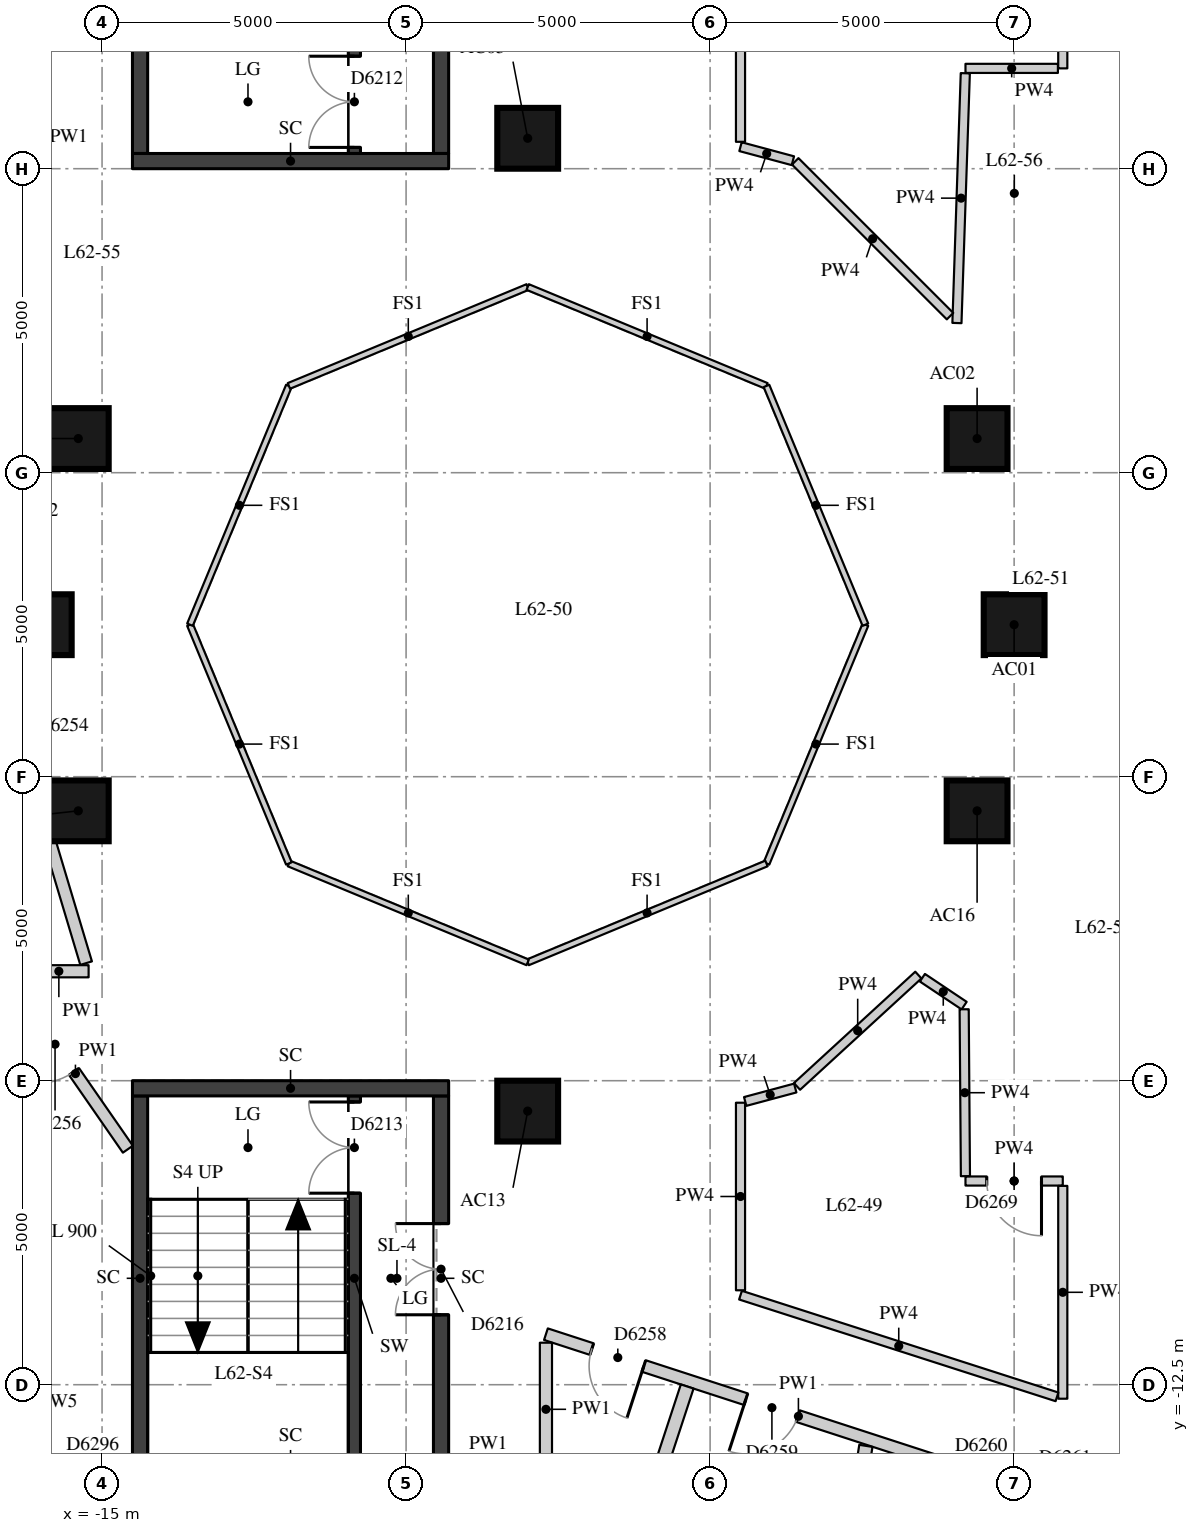
"""IFC4 building model, lengths in metres.
Left out: names, types, materials, properties, quantities, classifications, styles, units other than length and angle.
Written with IfcOpenShell. Run it as: python <this file> out.ifc"""

import sys

from ifc_helpers import new_model, si_unit, direction, frame, frame_2d, origin, origin_2d, place, context, subcontext, project, spatial, rectangle, extrude, element, fill, save


model = new_model("IFC4")
c1 = context("Model", 3, precision=1e-05, world=origin(), true_north=direction((0.0, 1.0)))
c2 = subcontext(c1, "Body", "Model", "MODEL_VIEW")
j1 = project(units=[si_unit("LENGTHUNIT", "METRE"), si_unit("PLANEANGLEUNIT", "RADIAN")], contexts=[c1])
p1 = place(None, origin())
s1 = spatial("IfcSite", under=j1, at=p1, CompositionType="ELEMENT")
p2 = place(p1, origin())
s2 = spatial("IfcBuilding", under=s1, at=p2, CompositionType="ELEMENT")
p3 = place(p2, frame((0.0, 0.0, 218.9)))
s3 = spatial("IfcBuildingStorey", under=s2, at=p3, CompositionType="ELEMENT", Elevation=218.9)
for number, where, z_axis, x_axis in (
    (1, (0.0, 0.0, 0.0), (0.0, 0.0, 1.0), (1.0, 0.0, 0.0)),
    (2, (-0.609, 3.062, 0.0), (0.0, 0.0, 1.0), (1.0, 0.0, 0.0)),
    (3, (-8.0, 8.0, 0.0), (0.0, 0.0, 1.0), (1.0, 0.0, 0.0)),
    (4, (-15.391, 3.062, 0.0), (0.0, 0.0, 1.0), (1.0, 0.0, 0.0)),
    (5, (-16.0, 0.0, 0.0), (0.0, 0.0, 1.0), (1.0, 0.0, 0.0)),
    (6, (-15.391, -3.062, 0.0), (0.0, 0.0, 1.0), (1.0, 0.0, 0.0)),
    (7, (-8.0, -8.0, 0.0), (0.0, 0.0, 1.0), (1.0, 0.0, 0.0)),
    (8, (-0.609, -3.062, 0.0), (0.0, 0.0, 1.0), (1.0, 0.0, 0.0)),
):
    element("IfcColumn", number, at=place(p3, frame(where, z_axis=z_axis, x_axis=x_axis)), inside=s3, PredefinedType="COLUMN", context=c2, shape_type="SweptSolid", body=[
        extrude(rectangle(XDim=1.0, YDim=1.0, at=origin_2d()), origin(), (0.0, 0.0, 1.0), 3.3),
    ])
p4 = place(p3, frame((-17.769, -12.725, 0.0), z_axis=(0.0, 0.0, 1.0), x_axis=(0.742485377568, -0.669862272484, 0.0)))
e9 = element("IfcWall", 9, at=p4, inside=s3, PredefinedType="SOLIDWALL", context=c2, shape_type="SweptSolid", body=[
    extrude(rectangle(XDim=3.98, YDim=0.45, at=frame_2d((1.99, 0.0))), origin(), (0.0, 0.0, 1.0), 3.02),
])
p5 = place(p4, frame((0.915, 0.0, 0.4)))
e10 = element("IfcOpeningElement", 10, at=p5, cuts=e9, PredefinedType="OPENING", context=c2, shape_type="SweptSolid", body=[
    extrude(rectangle(XDim=1.0, YDim=1.75, at=frame_2d((0.5, 0.875))), frame((0.0, 0.235, 0.0), z_axis=(0.0, -1.0, 0.0), x_axis=(1.0, 0.0, 0.0)), (0.0, 0.0, 1.0), 0.47),
])
p6 = place(p4, frame((2.065, 0.0, 0.0)))
e11 = element("IfcOpeningElement", 11, at=p6, cuts=e9, PredefinedType="OPENING", context=c2, shape_type="SweptSolid", body=[
    extrude(rectangle(XDim=1.0, YDim=2.15, at=frame_2d((0.5, 1.075))), frame((0.0, 0.235, 0.0), z_axis=(0.0, -1.0, 0.0), x_axis=(1.0, 0.0, 0.0)), (0.0, 0.0, 1.0), 0.47),
])
p7 = place(p3, frame((-10.85, 7.75, 0.0), z_axis=(0.0, 0.0, 1.0), x_axis=(0.0, 1.0, 0.0)))
e12 = element("IfcWall", 12, at=p7, inside=s3, PredefinedType="SHEAR", context=c2, shape_type="SweptSolid", body=[
    extrude(rectangle(XDim=6.0, YDim=0.2, at=frame_2d((3.0, 0.0))), origin(), (0.0, 0.0, 1.0), 3.02),
])
p8 = place(p7, frame((0.1, 0.0, 0.0)))
e13 = element("IfcOpeningElement", 13, at=p8, cuts=e12, PredefinedType="OPENING", context=c2, shape_type="SweptSolid", body=[
    extrude(rectangle(XDim=1.5, YDim=2.1, at=frame_2d((0.75, 1.05))), frame((0.0, 0.11, 0.0), z_axis=(0.0, -1.0, 0.0), x_axis=(1.0, 0.0, 0.0)), (0.0, 0.0, 1.0), 0.22),
])
p9 = place(p3, frame((-10.85, -13.75, 0.0), z_axis=(0.0, 0.0, 1.0), x_axis=(0.0, 1.0, 0.0)))
e14 = element("IfcWall", 14, at=p9, inside=s3, PredefinedType="SHEAR", context=c2, shape_type="SweptSolid", body=[
    extrude(rectangle(XDim=6.0, YDim=0.2, at=frame_2d((3.0, 0.0))), origin(), (0.0, 0.0, 1.0), 3.02),
])
p10 = place(p9, frame((4.4, 0.0, 0.0)))
e15 = element("IfcOpeningElement", 15, at=p10, cuts=e14, PredefinedType="OPENING", context=c2, shape_type="SweptSolid", body=[
    extrude(rectangle(XDim=1.5, YDim=2.1, at=frame_2d((0.75, 1.05))), frame((0.0, 0.11, 0.0), z_axis=(0.0, -1.0, 0.0), x_axis=(1.0, 0.0, 0.0)), (0.0, 0.0, 1.0), 0.22),
])
p11 = place(p3, frame((-14.375, 7.75, -0.28), z_axis=(0.0, 0.0, 1.0), x_axis=(0.0, 1.0, 0.0)))
e16 = element("IfcWall", 16, at=p11, inside=s3, PredefinedType="SHEAR", context=c2, shape_type="SweptSolid", body=[
    extrude(rectangle(XDim=6.0, YDim=0.25, at=frame_2d((3.0, 0.0))), origin(), (0.0, 0.0, 1.0), 3.3),
])
p12 = place(p3, frame((-9.425, 7.75, -0.28), z_axis=(0.0, 0.0, 1.0), x_axis=(0.0, 1.0, 0.0)))
e17 = element("IfcWall", 17, at=p12, inside=s3, PredefinedType="SHEAR", context=c2, shape_type="SweptSolid", body=[
    extrude(rectangle(XDim=6.0, YDim=0.25, at=frame_2d((3.0, 0.0))), origin(), (0.0, 0.0, 1.0), 3.3),
])
p13 = place(p12, frame((2.1, 0.0, 0.28)))
e18 = element("IfcOpeningElement", 18, at=p13, cuts=e17, PredefinedType="OPENING", context=c2, shape_type="SweptSolid", body=[
    extrude(rectangle(XDim=1.5, YDim=2.1, at=frame_2d((0.75, 1.05))), frame((0.0, 0.135, 0.0), z_axis=(0.0, -1.0, 0.0), x_axis=(1.0, 0.0, 0.0)), (0.0, 0.0, 1.0), 0.27),
])
p14 = place(p3, frame((-14.5, 7.625, -0.28), z_axis=(0.0, 0.0, 1.0), x_axis=(1.0, 0.0, 0.0)))
e19 = element("IfcWall", 19, at=p14, inside=s3, PredefinedType="SHEAR", context=c2, shape_type="SweptSolid", body=[
    extrude(rectangle(XDim=5.2, YDim=0.25, at=frame_2d((2.6, 0.0))), origin(), (0.0, 0.0, 1.0), 3.3),
])
p15 = place(p3, frame((-14.375, -13.75, -0.28), z_axis=(0.0, 0.0, 1.0), x_axis=(0.0, 1.0, 0.0)))
e20 = element("IfcWall", 20, at=p15, inside=s3, PredefinedType="SHEAR", context=c2, shape_type="SweptSolid", body=[
    extrude(rectangle(XDim=6.0, YDim=0.25, at=frame_2d((3.0, 0.0))), origin(), (0.0, 0.0, 1.0), 3.3),
])
p16 = place(p3, frame((-9.425, -13.75, -0.28), z_axis=(0.0, 0.0, 1.0), x_axis=(0.0, 1.0, 0.0)))
e21 = element("IfcWall", 21, at=p16, inside=s3, PredefinedType="SHEAR", context=c2, shape_type="SweptSolid", body=[
    extrude(rectangle(XDim=6.0, YDim=0.25, at=frame_2d((3.0, 0.0))), origin(), (0.0, 0.0, 1.0), 3.3),
])
p17 = place(p16, frame((2.4, 0.0, 0.28)))
e22 = element("IfcOpeningElement", 22, at=p17, cuts=e21, PredefinedType="OPENING", context=c2, shape_type="SweptSolid", body=[
    extrude(rectangle(XDim=1.5, YDim=2.1, at=frame_2d((0.75, 1.05))), frame((0.0, 0.135, 0.0), z_axis=(0.0, -1.0, 0.0), x_axis=(1.0, 0.0, 0.0)), (0.0, 0.0, 1.0), 0.27),
])
p18 = place(p3, frame((-14.5, -7.625, -0.28), z_axis=(0.0, 0.0, 1.0), x_axis=(1.0, 0.0, 0.0)))
e23 = element("IfcWall", 23, at=p18, inside=s3, PredefinedType="SHEAR", context=c2, shape_type="SweptSolid", body=[
    extrude(rectangle(XDim=5.2, YDim=0.25, at=frame_2d((2.6, 0.0))), origin(), (0.0, 0.0, 1.0), 3.3),
])
p19 = place(p3, frame((9.922, -12.183, 0.0), z_axis=(0.0, 0.0, 1.0), x_axis=(-0.972292362394, -0.233768180104, 0.0)))
e24 = element("IfcWall", 24, at=p19, inside=s3, PredefinedType="PARTITIONING", context=c2, shape_type="SweptSolid", body=[
    extrude(rectangle(XDim=9.485, YDim=0.2, at=frame_2d((4.742, 0.0))), origin(), (0.0, 0.0, 1.0), 2.42),
])
p20 = place(p19, frame((8.245, 0.0, 0.0)))
e25 = element("IfcOpeningElement", 25, at=p20, cuts=e24, PredefinedType="OPENING", context=c2, shape_type="SweptSolid", body=[
    extrude(rectangle(XDim=1.1, YDim=2.1, at=frame_2d((0.55, 1.05))), frame((0.0, 0.11, 0.0), z_axis=(0.0, -1.0, 0.0), x_axis=(1.0, 0.0, 0.0)), (0.0, 0.0, 1.0), 0.22),
])
p21 = place(p3, frame((0.605, -14.369, 0.0), z_axis=(0.0, 0.0, 1.0), x_axis=(-0.950994614205, 0.309207444529, 0.0)))
e26 = element("IfcWall", 26, at=p21, inside=s3, PredefinedType="PARTITIONING", context=c2, shape_type="SweptSolid", body=[
    extrude(rectangle(XDim=8.733, YDim=0.2, at=frame_2d((4.366, 0.0))), origin(), (0.0, 0.0, 1.0), 3.02),
])
p22 = place(p21, frame((7.04, 0.0, 0.0)))
e27 = element("IfcOpeningElement", 27, at=p22, cuts=e26, PredefinedType="OPENING", context=c2, shape_type="SweptSolid", body=[
    extrude(rectangle(XDim=0.9, YDim=2.1, at=frame_2d((0.45, 1.05))), frame((0.0, 0.11, 0.0), z_axis=(0.0, -1.0, 0.0), x_axis=(1.0, 0.0, 0.0)), (0.0, 0.0, 1.0), 0.22),
])
p23 = place(p21, frame((4.375, 0.0, 0.0)))
e28 = element("IfcOpeningElement", 28, at=p23, cuts=e26, PredefinedType="OPENING", context=c2, shape_type="SweptSolid", body=[
    extrude(rectangle(XDim=0.9, YDim=2.1, at=frame_2d((0.45, 1.05))), frame((0.0, 0.11, 0.0), z_axis=(0.0, -1.0, 0.0), x_axis=(1.0, 0.0, 0.0)), (0.0, 0.0, 1.0), 0.22),
])
p24 = place(p21, frame((1.145, 0.0, 0.0)))
e29 = element("IfcOpeningElement", 29, at=p24, cuts=e26, PredefinedType="OPENING", context=c2, shape_type="SweptSolid", body=[
    extrude(rectangle(XDim=0.9, YDim=2.1, at=frame_2d((0.45, 1.05))), frame((0.0, 0.11, 0.0), z_axis=(0.0, -1.0, 0.0), x_axis=(1.0, 0.0, 0.0)), (0.0, 0.0, 1.0), 0.22),
])
p25 = place(p3, frame((-7.7, -11.809, 0.0), z_axis=(0.0, 0.0, 1.0), x_axis=(0.0, -1.0, 0.0)))
e30 = element("IfcWall", 30, at=p25, inside=s3, PredefinedType="PARTITIONING", context=c2, shape_type="SweptSolid", body=[
    extrude(rectangle(XDim=2.191, YDim=0.2, at=frame_2d((1.095, 0.0))), origin(), (0.0, 0.0, 1.0), 3.02),
])
p26 = place(p3, frame((-14.575, -8.627, 0.0), z_axis=(0.0, 0.0, 1.0), x_axis=(-0.569910381143, 0.821706856163, 0.0)))
e31 = element("IfcWall", 31, at=p26, inside=s3, PredefinedType="PARTITIONING", context=c2, shape_type="SweptSolid", body=[
    extrude(rectangle(XDim=3.026, YDim=0.2, at=frame_2d((1.513, 0.0))), origin(), (0.0, 0.0, 1.0), 3.02),
])
p27 = place(p26, frame((1.552, 0.0, 0.0)))
e32 = element("IfcOpeningElement", 32, at=p27, cuts=e31, PredefinedType="OPENING", context=c2, shape_type="SweptSolid", body=[
    extrude(rectangle(XDim=1.1, YDim=2.1, at=frame_2d((0.55, 1.05))), frame((0.0, 0.11, 0.0), z_axis=(0.0, -1.0, 0.0), x_axis=(1.0, 0.0, 0.0)), (0.0, 0.0, 1.0), 0.22),
])
p28 = place(p3, frame((-16.2, -5.7, 0.0), z_axis=(0.0, 0.0, 1.0), x_axis=(1.0, 0.0, 0.0)))
e33 = element("IfcWall", 33, at=p28, inside=s3, PredefinedType="PARTITIONING", context=c2, shape_type="SweptSolid", body=[
    extrude(rectangle(XDim=0.979, YDim=0.2, at=frame_2d((0.489, 0.0))), origin(), (0.0, 0.0, 1.0), 3.02),
])
p29 = place(p3, frame((-15.262, -5.567, 0.0), z_axis=(0.0, 0.0, 1.0), x_axis=(-0.28704593875, 0.957916817395, 0.0)))
e34 = element("IfcWall", 34, at=p29, inside=s3, PredefinedType="PARTITIONING", context=c2, shape_type="SweptSolid", body=[
    extrude(rectangle(XDim=6.751, YDim=0.2, at=frame_2d((3.375, 0.0))), origin(), (0.0, 0.0, 1.0), 3.02),
])
p30 = place(p29, frame((3.259, 0.0, 0.0)))
e35 = element("IfcOpeningElement", 35, at=p30, cuts=e34, PredefinedType="OPENING", context=c2, shape_type="SweptSolid", body=[
    extrude(rectangle(XDim=1.1, YDim=2.1, at=frame_2d((0.55, 1.05))), frame((0.0, 0.11, 0.0), z_axis=(0.0, -1.0, 0.0), x_axis=(1.0, 0.0, 0.0)), (0.0, 0.0, 1.0), 0.22),
])
p31 = place(p3, frame((0.8, 12.12, 0.0), z_axis=(0.0, 0.0, 1.0), x_axis=(0.0, -1.0, 0.0)))
e36 = element("IfcWall", 36, at=p31, inside=s3, PredefinedType="PARTITIONING", context=c2, shape_type="SweptSolid", body=[
    extrude(rectangle(XDim=2.97, YDim=0.15, at=frame_2d((1.485, 0.0))), origin(), (0.0, 0.0, 1.0), 3.02),
])
p32 = place(p3, frame((0.72, 9.15, 0.0), z_axis=(0.0, 0.0, 1.0), x_axis=(-1.0, 0.0, 0.0)))
e37 = element("IfcWall", 37, at=p32, inside=s3, PredefinedType="PARTITIONING", context=c2, shape_type="SweptSolid", body=[
    extrude(rectangle(XDim=1.52, YDim=0.15, at=frame_2d((0.76, 0.0))), origin(), (0.0, 0.0, 1.0), 3.02),
])
p33 = place(p3, frame((-0.803, 9.07, 0.0), z_axis=(0.0, 0.0, 1.0), x_axis=(-0.033496761224, -0.999438826036, 0.0)))
e38 = element("IfcWall", 38, at=p33, inside=s3, PredefinedType="PARTITIONING", context=c2, shape_type="SweptSolid", body=[
    extrude(rectangle(XDim=4.111, YDim=0.15, at=frame_2d((2.055, 0.0))), origin(), (0.0, 0.0, 1.0), 3.02),
])
p34 = place(p3, frame((-1.054, 5.075, 0.0), z_axis=(0.0, 0.0, 1.0), x_axis=(-0.707106781187, 0.707106781187, 0.0)))
e39 = element("IfcWall", 39, at=p34, inside=s3, PredefinedType="PARTITIONING", context=c2, shape_type="SweptSolid", body=[
    extrude(rectangle(XDim=3.601, YDim=0.15, at=frame_2d((1.8, 0.0))), origin(), (0.0, 0.0, 1.0), 3.02),
])
p35 = place(p3, frame((-3.639, 7.631, 0.0), z_axis=(0.0, 0.0, 1.0), x_axis=(-0.965879594242, 0.258991523853, 0.0)))
e40 = element("IfcWall", 40, at=p35, inside=s3, PredefinedType="PARTITIONING", context=c2, shape_type="SweptSolid", body=[
    extrude(rectangle(XDim=0.892, YDim=0.15, at=frame_2d((0.446, 0.0))), origin(), (0.0, 0.0, 1.0), 3.02),
])
p36 = place(p3, frame((-4.5, 7.942, 0.0), z_axis=(0.0, 0.0, 1.0), x_axis=(0.0, 1.0, 0.0)))
e41 = element("IfcWall", 41, at=p36, inside=s3, PredefinedType="PARTITIONING", context=c2, shape_type="SweptSolid", body=[
    extrude(rectangle(XDim=3.538, YDim=0.15, at=frame_2d((1.769, 0.0))), origin(), (0.0, 0.0, 1.0), 3.02),
])
p37 = place(p3, frame((-0.8, -9.15, 0.0), z_axis=(0.0, 0.0, 1.0), x_axis=(1.0, 0.0, 0.0)))
e42 = element("IfcWall", 42, at=p37, inside=s3, PredefinedType="PARTITIONING", context=c2, shape_type="SweptSolid", body=[
    extrude(rectangle(XDim=1.6, YDim=0.15, at=frame_2d((0.8, 0.0))), origin(), (0.0, 0.0, 1.0), 3.02),
])
p38 = place(p37, frame((0.35, 0.0, 0.0)))
e43 = element("IfcOpeningElement", 43, at=p38, cuts=e42, PredefinedType="OPENING", context=c2, shape_type="SweptSolid", body=[
    extrude(rectangle(XDim=0.9, YDim=2.1, at=frame_2d((0.45, 1.05))), frame((0.0, 0.085, 0.0), z_axis=(0.0, -1.0, 0.0), x_axis=(1.0, 0.0, 0.0)), (0.0, 0.0, 1.0), 0.17),
])
p39 = place(p3, frame((0.8, -9.23, 0.0), z_axis=(0.0, 0.0, 1.0), x_axis=(0.0, -1.0, 0.0)))
e44 = element("IfcWall", 44, at=p39, inside=s3, PredefinedType="PARTITIONING", context=c2, shape_type="SweptSolid", body=[
    extrude(rectangle(XDim=3.5, YDim=0.15, at=frame_2d((1.75, 0.0))), origin(), (0.0, 0.0, 1.0), 3.02),
])
p40 = place(p3, frame((0.705, -12.7, 0.0), z_axis=(0.0, 0.0, 1.0), x_axis=(-0.952035530576, 0.305987497327, 0.0)))
e45 = element("IfcWall", 45, at=p40, inside=s3, PredefinedType="PARTITIONING", context=c2, shape_type="SweptSolid", body=[
    extrude(rectangle(XDim=5.467, YDim=0.15, at=frame_2d((2.733, 0.0))), origin(), (0.0, 0.0, 1.0), 3.02),
])
p41 = place(p3, frame((-4.5, -10.947, 0.0), z_axis=(0.0, 0.0, 1.0), x_axis=(0.0, 1.0, 0.0)))
e46 = element("IfcWall", 46, at=p41, inside=s3, PredefinedType="PARTITIONING", context=c2, shape_type="SweptSolid", body=[
    extrude(rectangle(XDim=3.085, YDim=0.15, at=frame_2d((1.542, 0.0))), origin(), (0.0, 0.0, 1.0), 3.02),
])
p42 = place(p3, frame((-4.423, -7.842, 0.0), z_axis=(0.0, 0.0, 1.0), x_axis=(0.965853333569, 0.259089440221, 0.0)))
e47 = element("IfcWall", 47, at=p42, inside=s3, PredefinedType="PARTITIONING", context=c2, shape_type="SweptSolid", body=[
    extrude(rectangle(XDim=0.852, YDim=0.15, at=frame_2d((0.426, 0.0))), origin(), (0.0, 0.0, 1.0), 3.02),
])
p43 = place(p3, frame((-3.571, -7.594, 0.0), z_axis=(0.0, 0.0, 1.0), x_axis=(0.736783660812, 0.676128565555, 0.0)))
e48 = element("IfcWall", 48, at=p43, inside=s3, PredefinedType="PARTITIONING", context=c2, shape_type="SweptSolid", body=[
    extrude(rectangle(XDim=2.709, YDim=0.15, at=frame_2d((1.354, 0.0))), origin(), (0.0, 0.0, 1.0), 3.02),
])
p44 = place(p3, frame((-1.509, -5.806, 0.0), z_axis=(0.0, 0.0, 1.0), x_axis=(0.831367153095, -0.55572354346, 0.0)))
e49 = element("IfcWall", 49, at=p44, inside=s3, PredefinedType="PARTITIONING", context=c2, shape_type="SweptSolid", body=[
    extrude(rectangle(XDim=0.825, YDim=0.15, at=frame_2d((0.413, 0.0))), origin(), (0.0, 0.0, 1.0), 3.02),
])
p45 = place(p3, frame((-0.822, -6.325, 0.0), z_axis=(0.0, 0.0, 1.0), x_axis=(0.007471771501, -0.999972085926, 0.0)))
e50 = element("IfcWall", 50, at=p45, inside=s3, PredefinedType="PARTITIONING", context=c2, shape_type="SweptSolid", body=[
    extrude(rectangle(XDim=2.745, YDim=0.15, at=frame_2d((1.372, 0.0))), origin(), (0.0, 0.0, 1.0), 3.02),
])
p46 = place(p3, frame((-7.907, -20.235, 0.0), z_axis=(0.0, 0.0, 1.0), x_axis=(0.311998426629, 0.950082618397, 0.0)))
e51 = element("IfcWall", 51, at=p46, inside=s3, PredefinedType="PARTITIONING", context=c2, shape_type="SweptSolid", body=[
    extrude(rectangle(XDim=8.111, YDim=0.22, at=frame_2d((4.055, 0.0))), origin(), (0.0, 0.0, 1.0), 3.02),
])
p47 = place(p3, frame((-3.671, -21.256, 0.0), z_axis=(0.0, 0.0, 1.0), x_axis=(0.1571047049, 0.98758195189, 0.0)))
e52 = element("IfcWall", 52, at=p47, inside=s3, PredefinedType="PARTITIONING", context=c2, shape_type="SweptSolid", body=[
    extrude(rectangle(XDim=7.848, YDim=0.22, at=frame_2d((3.924, 0.0))), origin(), (0.0, 0.0, 1.0), 2.57),
])
for number, where, z_axis, x_axis in (
    (53, (-2.446, 0.0, 0.0), (0.0, 0.0, 1.0), (-0.383, -0.924, 0.0)),
    (54, (-4.073, -3.927, 0.0), (0.0, 0.0, 1.0), (-0.924, -0.383, 0.0)),
    (55, (-8.0, -5.554, 0.0), (0.0, 0.0, 1.0), (-0.924, 0.383, 0.0)),
    (56, (-11.927, -3.927, 0.0), (0.0, 0.0, 1.0), (-0.383, 0.924, 0.0)),
    (57, (-13.554, 0.0, 0.0), (0.0, 0.0, 1.0), (0.383, 0.924, 0.0)),
    (58, (-11.927, 3.927, 0.0), (0.0, 0.0, 1.0), (0.924, 0.383, 0.0)),
    (59, (-8.0, 5.554, 0.0), (0.0, 0.0, 1.0), (0.924, -0.383, 0.0)),
    (60, (-4.073, 3.927, 0.0), (0.0, 0.0, 1.0), (0.383, -0.924, 0.0)),
):
    element("IfcWall", number, at=place(p3, frame(where, z_axis=z_axis, x_axis=x_axis)), inside=s3, PredefinedType="PARTITIONING", context=c2, shape_type="SweptSolid", body=[
        extrude(rectangle(XDim=4.251, YDim=0.1, at=frame_2d((2.125, 0.0))), origin(), (0.0, 0.0, 1.0), 3.02),
    ])
p48 = place(p8, origin())
e61 = element("IfcDoor", 61, at=p48, inside=s3, OperationType="DOUBLE_DOOR_SINGLE_SWING", PredefinedType="DOOR", context=c2, shape_type="SweptSolid", body=[
    extrude(rectangle(XDim=1.5, YDim=2.1, at=frame_2d((0.75, 1.05))), frame((0.0, 0.025, 0.0), z_axis=(0.0, -1.0, 0.0), x_axis=(1.0, 0.0, 0.0)), (0.0, 0.0, 1.0), 0.05),
])
fill(e13, e61)
p49 = place(p10, origin())
e62 = element("IfcDoor", 62, at=p49, inside=s3, OperationType="DOUBLE_DOOR_SINGLE_SWING", PredefinedType="DOOR", context=c2, shape_type="SweptSolid", body=[
    extrude(rectangle(XDim=1.5, YDim=2.1, at=frame_2d((0.75, 1.05))), frame((0.0, 0.025, 0.0), z_axis=(0.0, -1.0, 0.0), x_axis=(1.0, 0.0, 0.0)), (0.0, 0.0, 1.0), 0.05),
])
fill(e15, e62)
p50 = place(p17, origin())
e63 = element("IfcDoor", 63, at=p50, inside=s3, OperationType="DOUBLE_DOOR_SINGLE_SWING", PredefinedType="DOOR", context=c2, shape_type="SweptSolid", body=[
    extrude(rectangle(XDim=1.5, YDim=2.1, at=frame_2d((0.75, 1.05))), frame((0.0, 0.025, 0.0), z_axis=(0.0, -1.0, 0.0), x_axis=(1.0, 0.0, 0.0)), (0.0, 0.0, 1.0), 0.05),
])
fill(e22, e63)
p51 = place(p27, origin())
e64 = element("IfcDoor", 64, at=p51, inside=s3, OperationType="SINGLE_SWING_RIGHT", PredefinedType="DOOR", context=c2, shape_type="SweptSolid", body=[
    extrude(rectangle(XDim=1.1, YDim=2.1, at=frame_2d((0.55, 1.05))), frame((0.0, 0.025, 0.0), z_axis=(0.0, -1.0, 0.0), x_axis=(1.0, 0.0, 0.0)), (0.0, 0.0, 1.0), 0.05),
])
fill(e32, e64)
p52 = place(p22, origin())
e65 = element("IfcDoor", 65, at=p52, inside=s3, OperationType="SINGLE_SWING_LEFT", PredefinedType="DOOR", context=c2, shape_type="SweptSolid", body=[
    extrude(rectangle(XDim=0.9, YDim=2.1, at=frame_2d((0.45, 1.05))), frame((0.0, 0.025, 0.0), z_axis=(0.0, -1.0, 0.0), x_axis=(1.0, 0.0, 0.0)), (0.0, 0.0, 1.0), 0.05),
])
fill(e27, e65)
p53 = place(p23, origin())
e66 = element("IfcDoor", 66, at=p53, inside=s3, OperationType="SINGLE_SWING_RIGHT", PredefinedType="DOOR", context=c2, shape_type="SweptSolid", body=[
    extrude(rectangle(XDim=0.9, YDim=2.1, at=frame_2d((0.45, 1.05))), frame((0.0, 0.025, 0.0), z_axis=(0.0, -1.0, 0.0), x_axis=(1.0, 0.0, 0.0)), (0.0, 0.0, 1.0), 0.05),
])
fill(e28, e66)
p54 = place(p38, origin())
e67 = element("IfcDoor", 67, at=p54, inside=s3, OperationType="SINGLE_SWING_LEFT", PredefinedType="DOOR", context=c2, shape_type="SweptSolid", body=[
    extrude(rectangle(XDim=0.9, YDim=2.1, at=frame_2d((0.45, 1.05))), frame((0.0, 0.025, 0.0), z_axis=(0.0, -1.0, 0.0), x_axis=(1.0, 0.0, 0.0)), (0.0, 0.0, 1.0), 0.05),
])
fill(e43, e67)
save(model, sys.argv[1])
